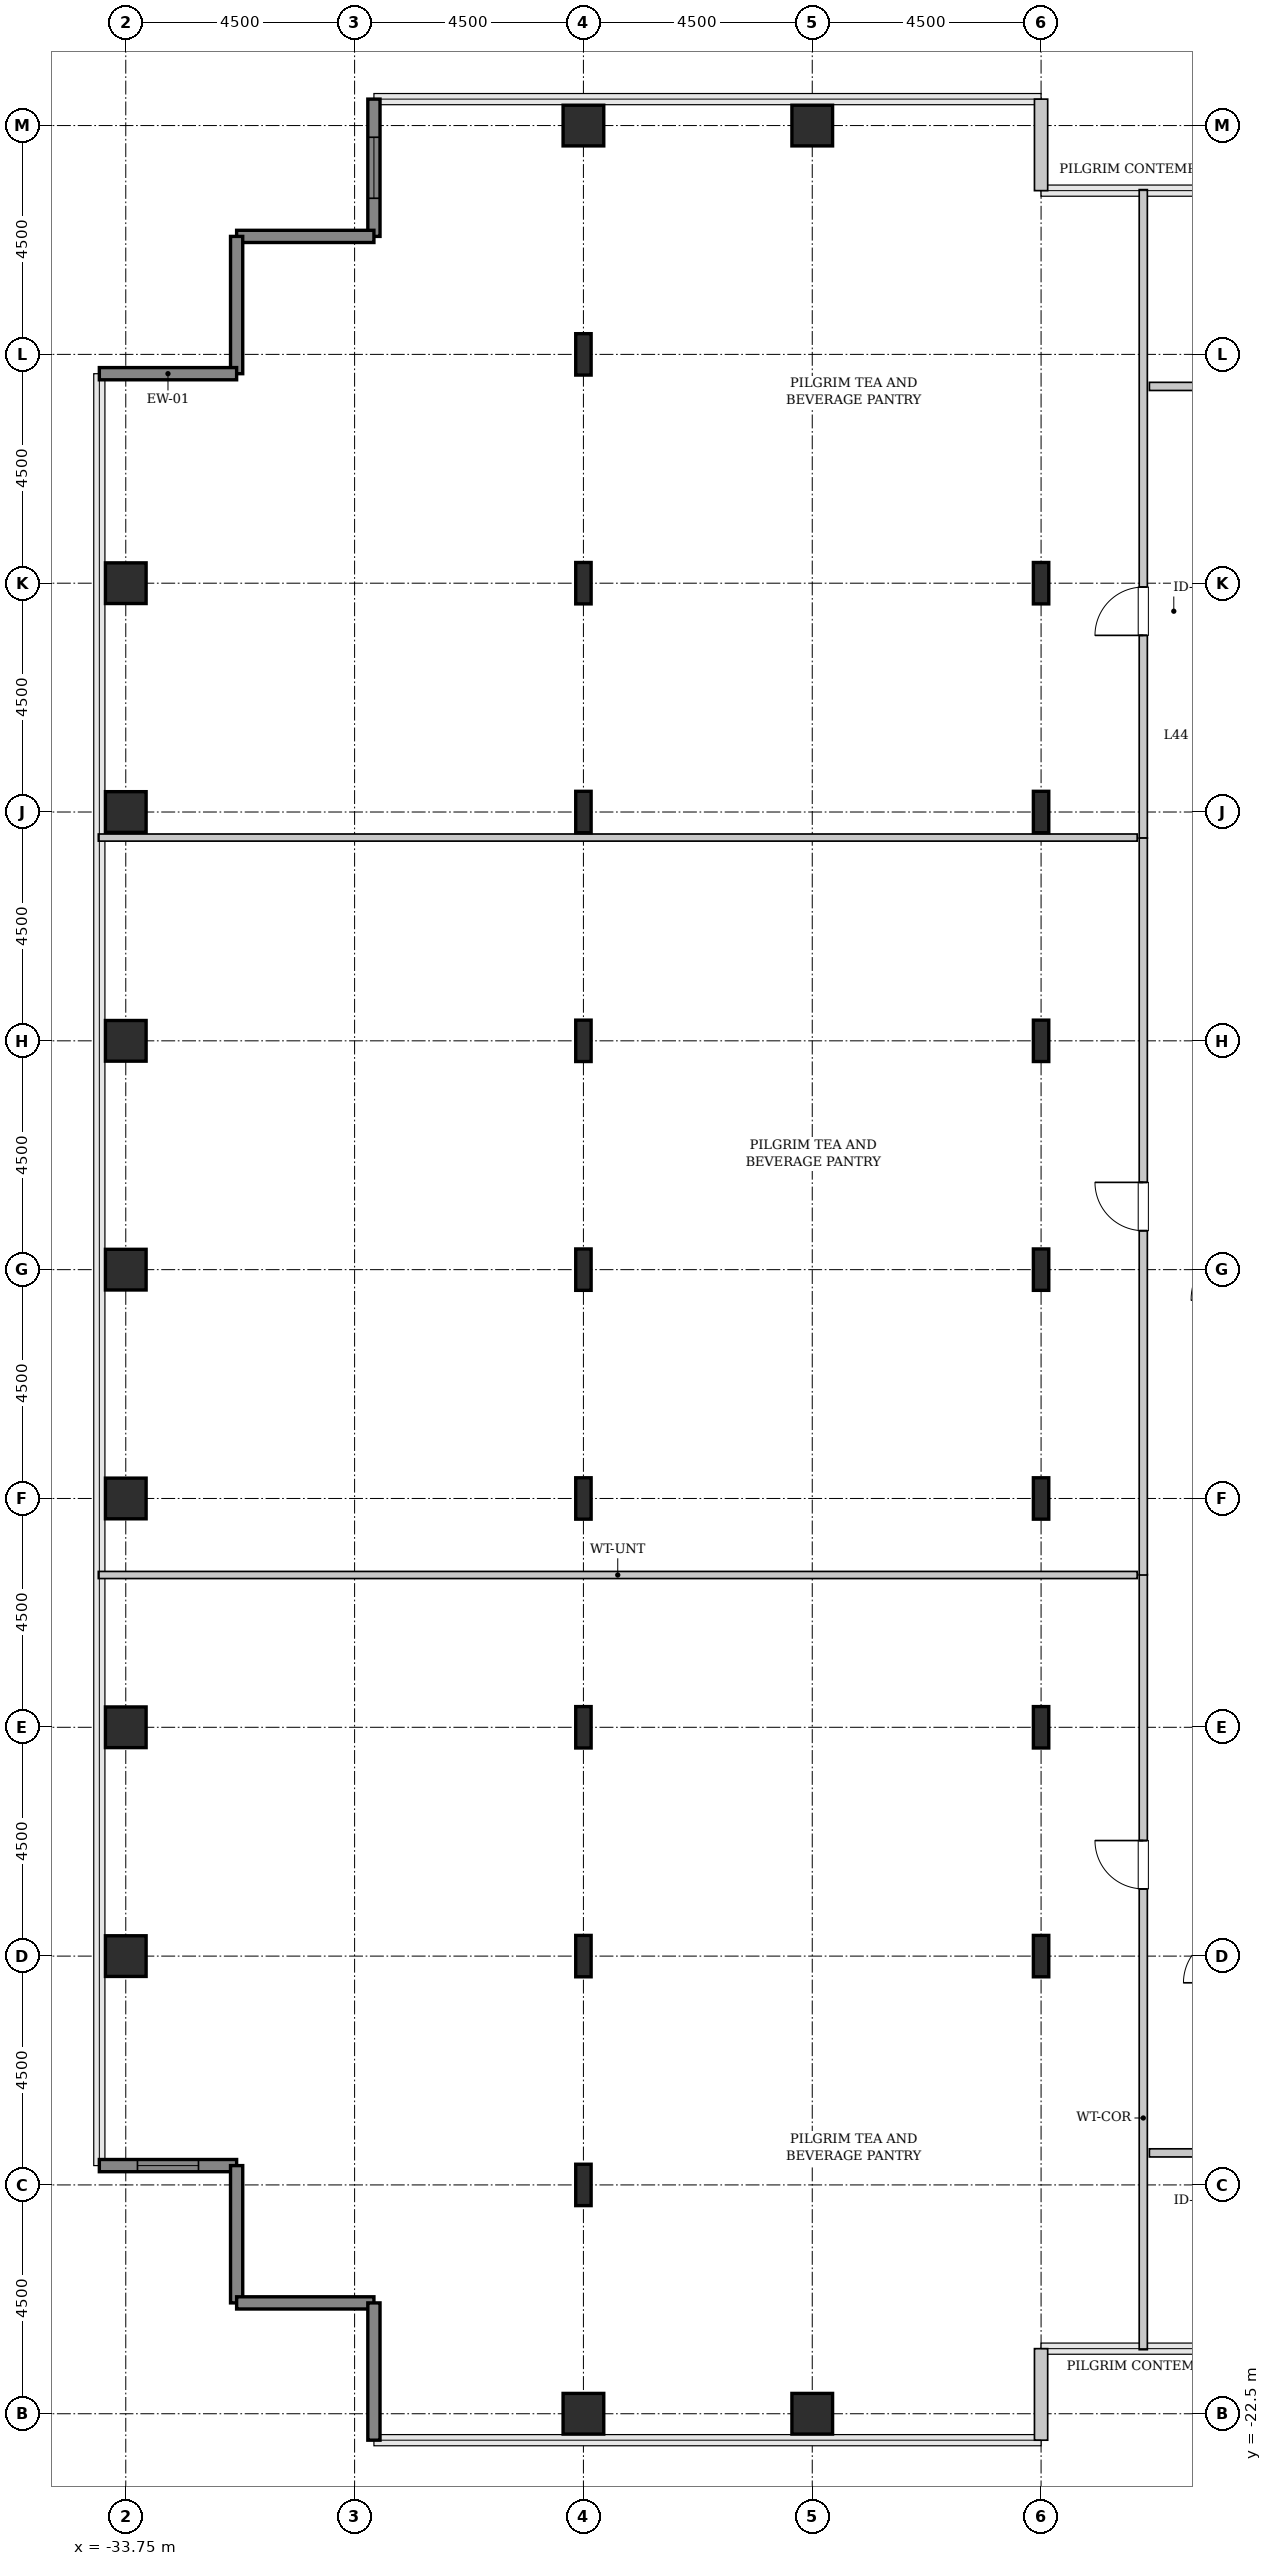
"""IFC4 building model, lengths in metres.
Left out: names, types, materials, properties, quantities, classifications, styles, units other than length and angle.
Written with IfcOpenShell. Run it as: python <this file> out.ifc"""

import sys

from ifc_helpers import new_model, si_unit, direction, frame, frame_2d, origin, origin_2d, place, context, subcontext, project, spatial, rectangle, hollow_rectangle, i_section, extrude, source, transform, mapped, element, fill, save


model = new_model("IFC4")
c1 = context("Model", 3, precision=1e-05, world=origin(), true_north=direction((0.0, 1.0)))
c2 = subcontext(c1, "Body", "Model", "MODEL_VIEW")
j1 = project(units=[si_unit("LENGTHUNIT", "METRE"), si_unit("PLANEANGLEUNIT", "RADIAN")], contexts=[c1])
p1 = place(None, origin())
s1 = spatial("IfcSite", under=j1, at=p1, CompositionType="ELEMENT")
p2 = place(p1, origin())
s2 = spatial("IfcBuilding", under=s1, at=p2, CompositionType="ELEMENT")
p3 = place(p2, frame((0.0, 0.0, 179.2)))
s3 = spatial("IfcBuildingStorey", under=s2, at=p3, CompositionType="ELEMENT", Elevation=179.2)
m1 = source(origin(), c2, "Body", "SweptSolid", [
    extrude(hollow_rectangle(XDim=0.8, YDim=0.8, WallThickness=0.04, InnerFilletRadius=0.04, OuterFilletRadius=0.08, at=origin_2d()), origin(), (0.0, 0.0, 1.0), 3.8),
])
for number, where, z_axis, x_axis in (
    (1, (-33.75, -13.5, 0.0), (0.0, 0.0, 1.0), (1.0, 0.0, 0.0)),
    (2, (-33.75, -9.0, 0.0), (0.0, 0.0, 1.0), (1.0, 0.0, 0.0)),
    (3, (-33.75, -4.5, 0.0), (0.0, 0.0, 1.0), (1.0, 0.0, 0.0)),
    (4, (-33.75, 0.0, 0.0), (0.0, 0.0, 1.0), (1.0, 0.0, 0.0)),
    (5, (-33.75, 4.5, 0.0), (0.0, 0.0, 1.0), (1.0, 0.0, 0.0)),
    (6, (-33.75, 9.0, 0.0), (0.0, 0.0, 1.0), (1.0, 0.0, 0.0)),
    (7, (-33.75, 13.5, 0.0), (0.0, 0.0, 1.0), (1.0, 0.0, 0.0)),
    (8, (-24.75, -22.5, 0.0), (0.0, 0.0, 1.0), (1.0, 0.0, 0.0)),
):
    element("IfcColumn", number, at=place(p3, frame(where, z_axis=z_axis, x_axis=x_axis)), inside=s3, PredefinedType="COLUMN", context=c2, shape_type="MappedRepresentation", body=[
        mapped(m1, transform((0.0, 0.0, 0.0), x_axis=(1.0, 0.0, 0.0), y_axis=(0.0, 1.0, 0.0), z_axis=(0.0, 0.0, 1.0), scale=1.0)),
    ])
m2 = source(origin(), c2, "Body", "SweptSolid", [
    extrude(i_section(OverallWidth=0.303, OverallDepth=0.814, WebThickness=0.021, FlangeThickness=0.04, FilletRadius=0.03, at=origin_2d()), origin(), (0.0, 0.0, 1.0), 3.8),
])
for number, where, z_axis, x_axis in (
    (9, (-24.75, -18.0, 0.0), (0.0, 0.0, 1.0), (1.0, 0.0, 0.0)),
    (10, (-24.75, -13.5, 0.0), (0.0, 0.0, 1.0), (1.0, 0.0, 0.0)),
    (11, (-24.75, -9.0, 0.0), (0.0, 0.0, 1.0), (1.0, 0.0, 0.0)),
    (12, (-24.75, -4.5, 0.0), (0.0, 0.0, 1.0), (1.0, 0.0, 0.0)),
    (13, (-24.75, 0.0, 0.0), (0.0, 0.0, 1.0), (1.0, 0.0, 0.0)),
    (14, (-24.75, 4.5, 0.0), (0.0, 0.0, 1.0), (1.0, 0.0, 0.0)),
    (15, (-24.75, 9.0, 0.0), (0.0, 0.0, 1.0), (1.0, 0.0, 0.0)),
    (16, (-24.75, 13.5, 0.0), (0.0, 0.0, 1.0), (1.0, 0.0, 0.0)),
    (17, (-24.75, 18.0, 0.0), (0.0, 0.0, 1.0), (1.0, 0.0, 0.0)),
):
    element("IfcColumn", number, at=place(p3, frame(where, z_axis=z_axis, x_axis=x_axis)), inside=s3, PredefinedType="COLUMN", context=c2, shape_type="MappedRepresentation", body=[
        mapped(m2, transform((0.0, 0.0, 0.0), x_axis=(1.0, 0.0, 0.0), y_axis=(0.0, 1.0, 0.0), z_axis=(0.0, 0.0, 1.0), scale=1.0)),
    ])
for number, where, z_axis, x_axis in (
    (18, (-24.75, 22.5, 0.0), (0.0, 0.0, 1.0), (1.0, 0.0, 0.0)),
    (19, (-20.25, -22.5, 0.0), (0.0, 0.0, 1.0), (1.0, 0.0, 0.0)),
    (20, (-20.25, 22.5, 0.0), (0.0, 0.0, 1.0), (1.0, 0.0, 0.0)),
):
    element("IfcColumn", number, at=place(p3, frame(where, z_axis=z_axis, x_axis=x_axis)), inside=s3, PredefinedType="COLUMN", context=c2, shape_type="MappedRepresentation", body=[
        mapped(m1, transform((0.0, 0.0, 0.0), x_axis=(1.0, 0.0, 0.0), y_axis=(0.0, 1.0, 0.0), z_axis=(0.0, 0.0, 1.0), scale=1.0)),
    ])
for number, where, z_axis, x_axis in (
    (21, (-15.75, -13.5, 0.0), (0.0, 0.0, 1.0), (1.0, 0.0, 0.0)),
    (22, (-15.75, -9.0, 0.0), (0.0, 0.0, 1.0), (1.0, 0.0, 0.0)),
    (23, (-15.75, -4.5, 0.0), (0.0, 0.0, 1.0), (1.0, 0.0, 0.0)),
    (24, (-15.75, 0.0, 0.0), (0.0, 0.0, 1.0), (1.0, 0.0, 0.0)),
    (25, (-15.75, 4.5, 0.0), (0.0, 0.0, 1.0), (1.0, 0.0, 0.0)),
    (26, (-15.75, 9.0, 0.0), (0.0, 0.0, 1.0), (1.0, 0.0, 0.0)),
    (27, (-15.75, 13.5, 0.0), (0.0, 0.0, 1.0), (1.0, 0.0, 0.0)),
):
    element("IfcColumn", number, at=place(p3, frame(where, z_axis=z_axis, x_axis=x_axis)), inside=s3, PredefinedType="COLUMN", context=c2, shape_type="MappedRepresentation", body=[
        mapped(m2, transform((0.0, 0.0, 0.0), x_axis=(1.0, 0.0, 0.0), y_axis=(0.0, 1.0, 0.0), z_axis=(0.0, 0.0, 1.0), scale=1.0)),
    ])
m3 = source(origin(), c2, "Body", "SweptSolid", [
    extrude(rectangle(XDim=1.8, YDim=0.26, at=frame_2d((0.9, 0.0))), origin(), (0.0, 0.0, 1.0), 3.55),
])
p4 = place(p3, frame((-15.75, 21.22, 0.0), z_axis=(0.0, 0.0, 1.0), x_axis=(0.0, 1.0, 0.0)))
e28 = element("IfcWall", 28, at=p4, inside=s3, PredefinedType="SOLIDWALL", context=c2, shape_type="MappedRepresentation", body=[
    mapped(m3, transform((0.0, 0.0, 0.0), x_axis=(1.0, 0.0, 0.0), y_axis=(0.0, 1.0, 0.0), z_axis=(0.0, 0.0, 1.0), scale=1.0)),
])
m4 = source(origin(), c2, "Body", "SweptSolid", [
    extrude(rectangle(XDim=2.7, YDim=0.24, at=frame_2d((1.35, 0.0))), origin(), (0.0, 0.0, 1.0), 3.55),
])
p5 = place(p3, frame((-28.87, 23.02, 0.0), z_axis=(0.0, 0.0, 1.0), x_axis=(0.0, -1.0, 0.0)))
e29 = element("IfcWall", 29, at=p5, inside=s3, PredefinedType="SHEAR", context=c2, shape_type="MappedRepresentation", body=[
    mapped(m4, transform((0.0, 0.0, 0.0), x_axis=(1.0, 0.0, 0.0), y_axis=(0.0, 1.0, 0.0), z_axis=(0.0, 0.0, 1.0), scale=1.0)),
])
p6 = place(p5, frame((0.75, 0.0, 0.85)))
e30 = element("IfcOpeningElement", 30, at=p6, cuts=e29, PredefinedType="OPENING", context=c2, shape_type="SweptSolid", body=[
    extrude(rectangle(XDim=1.2, YDim=1.8, at=frame_2d((0.6, 0.9))), frame((0.0, 0.13, 0.0), z_axis=(0.0, -1.0, 0.0), x_axis=(1.0, 0.0, 0.0)), (0.0, 0.0, 1.0), 0.26),
])
for number, where, z_axis, x_axis in (
    (31, (-28.87, 20.32, 0.0), (0.0, 0.0, 1.0), (-1.0, 0.0, 0.0)),
    (32, (-31.57, 20.32, 0.0), (0.0, 0.0, 1.0), (0.0, -1.0, 0.0)),
    (33, (-31.57, 17.62, 0.0), (0.0, 0.0, 1.0), (-1.0, 0.0, 0.0)),
):
    element("IfcWall", number, at=place(p3, frame(where, z_axis=z_axis, x_axis=x_axis)), inside=s3, PredefinedType="SHEAR", context=c2, shape_type="MappedRepresentation", body=[
        mapped(m4, transform((0.0, 0.0, 0.0), x_axis=(1.0, 0.0, 0.0), y_axis=(0.0, 1.0, 0.0), z_axis=(0.0, 0.0, 1.0), scale=1.0)),
    ])
p7 = place(p3, frame((-34.27, -17.62, 0.0), z_axis=(0.0, 0.0, 1.0), x_axis=(1.0, 0.0, 0.0)))
e34 = element("IfcWall", 34, at=p7, inside=s3, PredefinedType="SHEAR", context=c2, shape_type="MappedRepresentation", body=[
    mapped(m4, transform((0.0, 0.0, 0.0), x_axis=(1.0, 0.0, 0.0), y_axis=(0.0, 1.0, 0.0), z_axis=(0.0, 0.0, 1.0), scale=1.0)),
])
p8 = place(p7, frame((0.75, 0.0, 0.85)))
e35 = element("IfcOpeningElement", 35, at=p8, cuts=e34, PredefinedType="OPENING", context=c2, shape_type="SweptSolid", body=[
    extrude(rectangle(XDim=1.2, YDim=1.8, at=frame_2d((0.6, 0.9))), frame((0.0, 0.13, 0.0), z_axis=(0.0, -1.0, 0.0), x_axis=(1.0, 0.0, 0.0)), (0.0, 0.0, 1.0), 0.26),
])
for number, where, z_axis, x_axis in (
    (36, (-31.57, -17.62, 0.0), (0.0, 0.0, 1.0), (0.0, -1.0, 0.0)),
    (37, (-31.57, -20.32, 0.0), (0.0, 0.0, 1.0), (1.0, 0.0, 0.0)),
    (38, (-28.87, -20.32, 0.0), (0.0, 0.0, 1.0), (0.0, -1.0, 0.0)),
):
    element("IfcWall", number, at=place(p3, frame(where, z_axis=z_axis, x_axis=x_axis)), inside=s3, PredefinedType="SHEAR", context=c2, shape_type="MappedRepresentation", body=[
        mapped(m4, transform((0.0, 0.0, 0.0), x_axis=(1.0, 0.0, 0.0), y_axis=(0.0, 1.0, 0.0), z_axis=(0.0, 0.0, 1.0), scale=1.0)),
    ])
p9 = place(p3, frame((-15.75, -23.02, 0.0), z_axis=(0.0, 0.0, 1.0), x_axis=(0.0, 1.0, 0.0)))
e39 = element("IfcWall", 39, at=p9, inside=s3, PredefinedType="SOLIDWALL", context=c2, shape_type="MappedRepresentation", body=[
    mapped(m3, transform((0.0, 0.0, 0.0), x_axis=(1.0, 0.0, 0.0), y_axis=(0.0, 1.0, 0.0), z_axis=(0.0, 0.0, 1.0), scale=1.0)),
])
m5 = source(origin(), c2, "Body", "SweptSolid", [
    extrude(rectangle(XDim=15.245, YDim=0.16, at=frame_2d((7.623, 0.0))), origin(), (0.0, 0.0, 1.0), 3.535),
])
p10 = place(p3, frame((-13.74, -21.24, 0.0), z_axis=(0.0, 0.0, 1.0), x_axis=(0.0, 1.0, 0.0)))
e40 = element("IfcWall", 40, at=p10, inside=s3, PredefinedType="PARTITIONING", context=c2, shape_type="MappedRepresentation", body=[
    mapped(m5, transform((0.0, 0.0, 0.0), x_axis=(1.0, 0.0, 0.0), y_axis=(0.0, 1.0, 0.0), z_axis=(0.0, 0.0, 1.0), scale=1.0)),
])
p11 = place(p10, frame((9.062, 0.0, 0.0)))
e41 = element("IfcOpeningElement", 41, at=p11, cuts=e40, PredefinedType="OPENING", context=c2, shape_type="SweptSolid", body=[
    extrude(rectangle(XDim=0.95, YDim=2.1, at=frame_2d((0.475, 1.05))), frame((0.0, 0.09, 0.0), z_axis=(0.0, -1.0, 0.0), x_axis=(1.0, 0.0, 0.0)), (0.0, 0.0, 1.0), 0.18),
])
m6 = source(origin(), c2, "Body", "SweptSolid", [
    extrude(rectangle(XDim=20.43, YDim=0.14, at=frame_2d((10.215, 0.0))), origin(), (0.0, 0.0, 1.0), 3.535),
])
p12 = place(p3, frame((-34.29, -6.005, 0.0), z_axis=(0.0, 0.0, 1.0), x_axis=(1.0, 0.0, 0.0)))
e42 = element("IfcWall", 42, at=p12, inside=s3, PredefinedType="PARTITIONING", context=c2, shape_type="MappedRepresentation", body=[
    mapped(m6, transform((0.0, 0.0, 0.0), x_axis=(1.0, 0.0, 0.0), y_axis=(0.0, 1.0, 0.0), z_axis=(0.0, 0.0, 1.0), scale=1.0)),
])
m7 = source(origin(), c2, "Body", "SweptSolid", [
    extrude(rectangle(XDim=12.752, YDim=0.16, at=frame_2d((6.376, 0.0))), origin(), (0.0, 0.0, 1.0), 3.535),
])
p13 = place(p3, frame((-13.74, 8.488, 0.0), z_axis=(0.0, 0.0, 1.0), x_axis=(0.0, 1.0, 0.0)))
e43 = element("IfcWall", 43, at=p13, inside=s3, PredefinedType="PARTITIONING", context=c2, shape_type="MappedRepresentation", body=[
    mapped(m7, transform((0.0, 0.0, 0.0), x_axis=(1.0, 0.0, 0.0), y_axis=(0.0, 1.0, 0.0), z_axis=(0.0, 0.0, 1.0), scale=1.0)),
])
p14 = place(p13, frame((3.986, 0.0, 0.0)))
e44 = element("IfcOpeningElement", 44, at=p14, cuts=e43, PredefinedType="OPENING", context=c2, shape_type="SweptSolid", body=[
    extrude(rectangle(XDim=0.95, YDim=2.1, at=frame_2d((0.475, 1.05))), frame((0.0, 0.09, 0.0), z_axis=(0.0, -1.0, 0.0), x_axis=(1.0, 0.0, 0.0)), (0.0, 0.0, 1.0), 0.18),
])
m8 = source(origin(), c2, "Body", "SweptSolid", [
    extrude(rectangle(XDim=20.43, YDim=0.14, at=frame_2d((10.215, 0.0))), origin(), (0.0, 0.0, 1.0), 2.875),
])
p15 = place(p3, frame((-34.29, 8.498, 0.0), z_axis=(0.0, 0.0, 1.0), x_axis=(1.0, 0.0, 0.0)))
e45 = element("IfcWall", 45, at=p15, inside=s3, PredefinedType="PARTITIONING", context=c2, shape_type="MappedRepresentation", body=[
    mapped(m8, transform((0.0, 0.0, 0.0), x_axis=(1.0, 0.0, 0.0), y_axis=(0.0, 1.0, 0.0), z_axis=(0.0, 0.0, 1.0), scale=1.0)),
])
m9 = source(origin(), c2, "Body", "SweptSolid", [
    extrude(rectangle(XDim=14.492, YDim=0.16, at=frame_2d((7.246, 0.0))), origin(), (0.0, 0.0, 1.0), 3.535),
])
p16 = place(p3, frame((-13.74, -6.005, 0.0), z_axis=(0.0, 0.0, 1.0), x_axis=(0.0, 1.0, 0.0)))
e46 = element("IfcWall", 46, at=p16, inside=s3, PredefinedType="PARTITIONING", context=c2, shape_type="MappedRepresentation", body=[
    mapped(m9, transform((0.0, 0.0, 0.0), x_axis=(1.0, 0.0, 0.0), y_axis=(0.0, 1.0, 0.0), z_axis=(0.0, 0.0, 1.0), scale=1.0)),
])
p17 = place(p16, frame((6.771, 0.0, 0.0)))
e47 = element("IfcOpeningElement", 47, at=p17, cuts=e46, PredefinedType="OPENING", context=c2, shape_type="SweptSolid", body=[
    extrude(rectangle(XDim=0.95, YDim=2.1, at=frame_2d((0.475, 1.05))), frame((0.0, 0.09, 0.0), z_axis=(0.0, -1.0, 0.0), x_axis=(1.0, 0.0, 0.0)), (0.0, 0.0, 1.0), 0.18),
])
m10 = source(origin(), c2, "Body", "SweptSolid", [
    extrude(rectangle(XDim=4.16, YDim=0.16, at=frame_2d((2.08, 0.0))), origin(), (0.0, 0.0, 1.0), 3.535),
])
p18 = place(p3, frame((-13.62, 17.37, 0.0), z_axis=(0.0, 0.0, 1.0), x_axis=(1.0, 0.0, 0.0)))
e48 = element("IfcWall", 48, at=p18, inside=s3, PredefinedType="PARTITIONING", context=c2, shape_type="MappedRepresentation", body=[
    mapped(m10, transform((0.0, 0.0, 0.0), x_axis=(1.0, 0.0, 0.0), y_axis=(0.0, 1.0, 0.0), z_axis=(0.0, 0.0, 1.0), scale=1.0)),
])
p19 = place(p18, frame((0.969, 0.0, 0.0)))
e49 = element("IfcOpeningElement", 49, at=p19, cuts=e48, PredefinedType="OPENING", context=c2, shape_type="SweptSolid", body=[
    extrude(rectangle(XDim=0.95, YDim=2.1, at=frame_2d((0.475, 1.05))), frame((0.0, 0.09, 0.0), z_axis=(0.0, -1.0, 0.0), x_axis=(1.0, 0.0, 0.0)), (0.0, 0.0, 1.0), 0.18),
])
m11 = source(origin(), c2, "Body", "SweptSolid", [
    extrude(rectangle(XDim=3.825, YDim=0.16, at=frame_2d((1.913, 0.0))), origin(), (0.0, 0.0, 1.0), 3.535),
])
p20 = place(p3, frame((-13.62, -17.37, 0.0), z_axis=(0.0, 0.0, 1.0), x_axis=(1.0, 0.0, 0.0)))
e50 = element("IfcWall", 50, at=p20, inside=s3, PredefinedType="PARTITIONING", context=c2, shape_type="MappedRepresentation", body=[
    mapped(m11, transform((0.0, 0.0, 0.0), x_axis=(1.0, 0.0, 0.0), y_axis=(0.0, 1.0, 0.0), z_axis=(0.0, 0.0, 1.0), scale=1.0)),
])
p21 = place(p20, frame((1.067, 0.0, 0.0)))
e51 = element("IfcOpeningElement", 51, at=p21, cuts=e50, PredefinedType="OPENING", context=c2, shape_type="SweptSolid", body=[
    extrude(rectangle(XDim=0.95, YDim=2.1, at=frame_2d((0.475, 1.05))), frame((0.0, 0.09, 0.0), z_axis=(0.0, -1.0, 0.0), x_axis=(1.0, 0.0, 0.0)), (0.0, 0.0, 1.0), 0.18),
])
m12 = source(origin(), c2, "Body", "SweptSolid", [
    extrude(rectangle(XDim=1.2, YDim=1.8, at=frame_2d((0.6, 0.9))), frame((0.0, 0.03, 0.0), z_axis=(0.0, -1.0, 0.0), x_axis=(1.0, 0.0, 0.0)), (0.0, 0.0, 1.0), 0.06),
])
p22 = place(p6, origin())
e52 = element("IfcWindow", 52, at=p22, inside=s3, PartitioningType="SINGLE_PANEL", PredefinedType="WINDOW", context=c2, shape_type="MappedRepresentation", body=[
    mapped(m12, transform((0.0, 0.0, 0.0), x_axis=(1.0, 0.0, 0.0), y_axis=(0.0, 1.0, 0.0), z_axis=(0.0, 0.0, 1.0), scale=1.0)),
])
fill(e30, e52)
p23 = place(p8, origin())
e53 = element("IfcWindow", 53, at=p23, inside=s3, PartitioningType="SINGLE_PANEL", PredefinedType="WINDOW", context=c2, shape_type="MappedRepresentation", body=[
    mapped(m12, transform((0.0, 0.0, 0.0), x_axis=(1.0, 0.0, 0.0), y_axis=(0.0, 1.0, 0.0), z_axis=(0.0, 0.0, 1.0), scale=1.0)),
])
fill(e35, e53)
m13 = source(origin(), c2, "Body", "SweptSolid", [
    extrude(rectangle(XDim=0.95, YDim=2.1, at=frame_2d((0.475, 1.05))), frame((0.0, 0.025, 0.0), z_axis=(0.0, -1.0, 0.0), x_axis=(1.0, 0.0, 0.0)), (0.0, 0.0, 1.0), 0.05),
])
p24 = place(p11, origin())
e54 = element("IfcDoor", 54, at=p24, inside=s3, OperationType="SINGLE_SWING_RIGHT", PredefinedType="DOOR", context=c2, shape_type="MappedRepresentation", body=[
    mapped(m13, transform((0.0, 0.0, 0.0), x_axis=(1.0, 0.0, 0.0), y_axis=(0.0, 1.0, 0.0), z_axis=(0.0, 0.0, 1.0), scale=1.0)),
])
fill(e41, e54)
p25 = place(p14, origin())
e55 = element("IfcDoor", 55, at=p25, inside=s3, OperationType="SINGLE_SWING_LEFT", PredefinedType="DOOR", context=c2, shape_type="MappedRepresentation", body=[
    mapped(m13, transform((0.0, 0.0, 0.0), x_axis=(1.0, 0.0, 0.0), y_axis=(0.0, 1.0, 0.0), z_axis=(0.0, 0.0, 1.0), scale=1.0)),
])
fill(e44, e55)
p26 = place(p17, origin())
e56 = element("IfcDoor", 56, at=p26, inside=s3, OperationType="SINGLE_SWING_RIGHT", PredefinedType="DOOR", context=c2, shape_type="MappedRepresentation", body=[
    mapped(m13, transform((0.0, 0.0, 0.0), x_axis=(1.0, 0.0, 0.0), y_axis=(0.0, 1.0, 0.0), z_axis=(0.0, 0.0, 1.0), scale=1.0)),
])
fill(e47, e56)
save(model, sys.argv[1])
